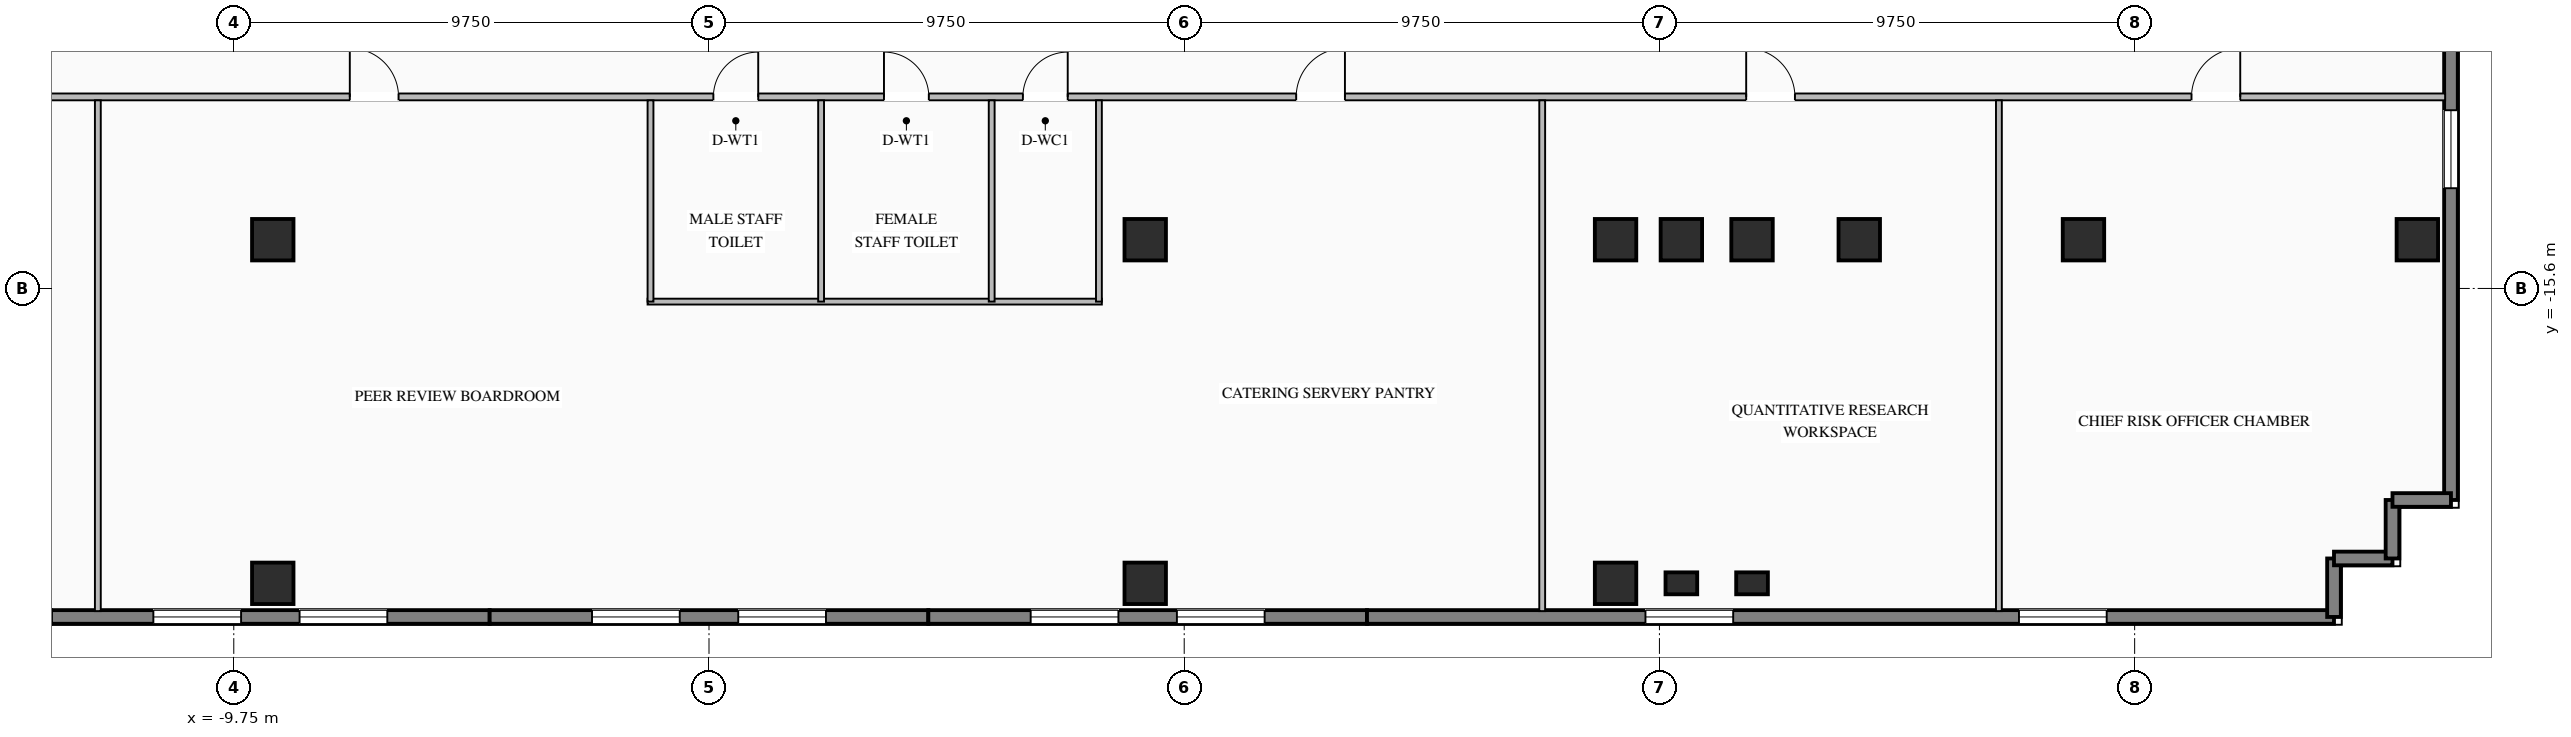
"""IFC4 building model, lengths in metres.
Left out: names, types, materials, properties, quantities, classifications, styles, units other than length and angle.
Written with IfcOpenShell. Run it as: python <this file> out.ifc"""

import sys

from ifc_helpers import new_model, si_unit, direction, frame, frame_2d, origin, origin_2d, place, context, subcontext, project, spatial, rectangle, i_section, extrude, element, fill, save


model = new_model("IFC4")
c1 = context("Model", 3, precision=1e-05, world=origin(), true_north=direction((0.0, 1.0)))
c2 = subcontext(c1, "Body", "Model", "MODEL_VIEW")
j1 = project(units=[si_unit("LENGTHUNIT", "METRE"), si_unit("PLANEANGLEUNIT", "RADIAN")], contexts=[c1])
p1 = place(None, origin())
s1 = spatial("IfcSite", under=j1, at=p1, CompositionType="ELEMENT")
p2 = place(p1, origin())
s2 = spatial("IfcBuilding", under=s1, at=p2, CompositionType="ELEMENT")
p3 = place(p2, frame((0.0, 0.0, 58.8)))
s3 = spatial("IfcBuildingStorey", under=s2, at=p3, CompositionType="ELEMENT", Elevation=58.8)
for number, where, z_axis, x_axis in (
    (1, (-8.95, -14.6, 0.0), (0.0, 0.0, 1.0), (1.0, 0.0, 0.0)),
    (2, (8.95, -14.6, 0.0), (0.0, 0.0, 1.0), (1.0, 0.0, 0.0)),
    (3, (18.6, -14.6, 0.0), (0.0, 0.0, 1.0), (1.0, 0.0, 0.0)),
    (4, (19.95, -14.6, 0.0), (0.0, 0.0, 1.0), (1.0, 0.0, 0.0)),
    (5, (21.4, -14.6, 0.0), (0.0, 0.0, 1.0), (1.0, 0.0, 0.0)),
    (6, (23.6, -14.6, 0.0), (0.0, 0.0, 1.0), (1.0, 0.0, 0.0)),
    (7, (28.2, -14.6, 0.0), (0.0, 0.0, 1.0), (1.0, 0.0, 0.0)),
    (8, (-8.95, -21.65, 0.0), (0.0, 0.0, 1.0), (1.0, 0.0, 0.0)),
    (9, (8.95, -21.65, 0.0), (0.0, 0.0, 1.0), (1.0, 0.0, 0.0)),
    (10, (18.6, -21.65, 0.0), (0.0, 0.0, 1.0), (1.0, 0.0, 0.0)),
    (11, (35.05, -14.6, 0.0), (0.0, 0.0, 1.0), (1.0, 0.0, 0.0)),
):
    element("IfcColumn", number, at=place(p3, frame(where, z_axis=z_axis, x_axis=x_axis)), inside=s3, PredefinedType="COLUMN", context=c2, shape_type="SweptSolid", body=[
        extrude(i_section(OverallWidth=0.85, OverallDepth=0.85, WebThickness=0.032, FlangeThickness=0.048, at=origin_2d()), origin(), (0.0, 0.0, 1.0), 3.45),
    ])
for number, where, z_axis, x_axis in (
    (12, (19.95, -21.65, 0.0), (0.0, 0.0, 1.0), (1.0, 0.0, 0.0)),
    (13, (21.4, -21.65, 0.0), (0.0, 0.0, 1.0), (1.0, 0.0, 0.0)),
):
    element("IfcColumn", number, at=place(p3, frame(where, z_axis=z_axis, x_axis=x_axis)), inside=s3, PredefinedType="PILASTER", context=c2, shape_type="SweptSolid", body=[
        extrude(rectangle(XDim=0.65, YDim=0.45, at=origin_2d()), origin(), (0.0, 0.0, 1.0), 3.45),
    ])
p4 = place(p3, frame((-4.5, -22.34, 0.0), z_axis=(0.0, 0.0, 1.0), x_axis=(-1.0, 0.0, 0.0)))
e14 = element("IfcWall", 14, at=p4, inside=s3, PredefinedType="STANDARD", context=c2, shape_type="SweptSolid", body=[
    extrude(rectangle(XDim=9.0, YDim=0.28, at=frame_2d((4.5, 0.0))), origin(), (0.0, 0.0, 1.0), 3.25),
])
p5 = place(p4, frame((2.1, 0.0, 0.76)))
e15 = element("IfcOpeningElement", 15, at=p5, cuts=e14, PredefinedType="OPENING", context=c2, shape_type="SweptSolid", body=[
    extrude(rectangle(XDim=1.8, YDim=1.95, at=frame_2d((0.9, 0.975))), frame((0.0, 0.15, 0.0), z_axis=(0.0, -1.0, 0.0), x_axis=(1.0, 0.0, 0.0)), (0.0, 0.0, 1.0), 0.3),
])
p6 = place(p4, frame((5.1, 0.0, 0.76)))
e16 = element("IfcOpeningElement", 16, at=p6, cuts=e14, PredefinedType="OPENING", context=c2, shape_type="SweptSolid", body=[
    extrude(rectangle(XDim=1.8, YDim=1.95, at=frame_2d((0.9, 0.975))), frame((0.0, 0.15, 0.0), z_axis=(0.0, -1.0, 0.0), x_axis=(1.0, 0.0, 0.0)), (0.0, 0.0, 1.0), 0.3),
])
p7 = place(p3, frame((4.5, -22.34, 0.0), z_axis=(0.0, 0.0, 1.0), x_axis=(-1.0, 0.0, 0.0)))
e17 = element("IfcWall", 17, at=p7, inside=s3, PredefinedType="STANDARD", context=c2, shape_type="SweptSolid", body=[
    extrude(rectangle(XDim=9.0, YDim=0.28, at=frame_2d((4.5, 0.0))), origin(), (0.0, 0.0, 1.0), 3.25),
])
p8 = place(p7, frame((2.1, 0.0, 0.76)))
e18 = element("IfcOpeningElement", 18, at=p8, cuts=e17, PredefinedType="OPENING", context=c2, shape_type="SweptSolid", body=[
    extrude(rectangle(XDim=1.8, YDim=1.95, at=frame_2d((0.9, 0.975))), frame((0.0, 0.15, 0.0), z_axis=(0.0, -1.0, 0.0), x_axis=(1.0, 0.0, 0.0)), (0.0, 0.0, 1.0), 0.3),
])
p9 = place(p7, frame((5.1, 0.0, 0.76)))
e19 = element("IfcOpeningElement", 19, at=p9, cuts=e17, PredefinedType="OPENING", context=c2, shape_type="SweptSolid", body=[
    extrude(rectangle(XDim=1.8, YDim=1.95, at=frame_2d((0.9, 0.975))), frame((0.0, 0.15, 0.0), z_axis=(0.0, -1.0, 0.0), x_axis=(1.0, 0.0, 0.0)), (0.0, 0.0, 1.0), 0.3),
])
p10 = place(p3, frame((13.5, -22.34, 0.0), z_axis=(0.0, 0.0, 1.0), x_axis=(-1.0, 0.0, 0.0)))
e20 = element("IfcWall", 20, at=p10, inside=s3, PredefinedType="STANDARD", context=c2, shape_type="SweptSolid", body=[
    extrude(rectangle(XDim=9.0, YDim=0.28, at=frame_2d((4.5, 0.0))), origin(), (0.0, 0.0, 1.0), 3.25),
])
p11 = place(p10, frame((2.1, 0.0, 0.76)))
e21 = element("IfcOpeningElement", 21, at=p11, cuts=e20, PredefinedType="OPENING", context=c2, shape_type="SweptSolid", body=[
    extrude(rectangle(XDim=1.8, YDim=1.95, at=frame_2d((0.9, 0.975))), frame((0.0, 0.15, 0.0), z_axis=(0.0, -1.0, 0.0), x_axis=(1.0, 0.0, 0.0)), (0.0, 0.0, 1.0), 0.3),
])
p12 = place(p10, frame((5.1, 0.0, 0.76)))
e22 = element("IfcOpeningElement", 22, at=p12, cuts=e20, PredefinedType="OPENING", context=c2, shape_type="SweptSolid", body=[
    extrude(rectangle(XDim=1.8, YDim=1.95, at=frame_2d((0.9, 0.975))), frame((0.0, 0.15, 0.0), z_axis=(0.0, -1.0, 0.0), x_axis=(1.0, 0.0, 0.0)), (0.0, 0.0, 1.0), 0.3),
])
p13 = place(p3, frame((33.34, -22.34, 0.0), z_axis=(0.0, 0.0, 1.0), x_axis=(-1.0, 0.0, 0.0)))
e23 = element("IfcWall", 23, at=p13, inside=s3, PredefinedType="STANDARD", context=c2, shape_type="SweptSolid", body=[
    extrude(rectangle(XDim=19.84, YDim=0.28, at=frame_2d((9.92, 0.0))), origin(), (0.0, 0.0, 1.0), 3.25),
])
p14 = place(p13, frame((4.663, 0.0, 0.76)))
e24 = element("IfcOpeningElement", 24, at=p14, cuts=e23, PredefinedType="OPENING", context=c2, shape_type="SweptSolid", body=[
    extrude(rectangle(XDim=1.8, YDim=1.95, at=frame_2d((0.9, 0.975))), frame((0.0, 0.15, 0.0), z_axis=(0.0, -1.0, 0.0), x_axis=(1.0, 0.0, 0.0)), (0.0, 0.0, 1.0), 0.3),
])
p15 = place(p13, frame((12.327, 0.0, 0.76)))
e25 = element("IfcOpeningElement", 25, at=p15, cuts=e23, PredefinedType="OPENING", context=c2, shape_type="SweptSolid", body=[
    extrude(rectangle(XDim=1.8, YDim=1.95, at=frame_2d((0.9, 0.975))), frame((0.0, 0.15, 0.0), z_axis=(0.0, -1.0, 0.0), x_axis=(1.0, 0.0, 0.0)), (0.0, 0.0, 1.0), 0.3),
])
p16 = place(p3, frame((35.74, 0.0, 0.0), z_axis=(0.0, 0.0, 1.0), x_axis=(0.0, -1.0, 0.0)))
e26 = element("IfcWall", 26, at=p16, inside=s3, PredefinedType="STANDARD", context=c2, shape_type="SweptSolid", body=[
    extrude(rectangle(XDim=19.94, YDim=0.28, at=frame_2d((9.97, 0.0))), origin(), (0.0, 0.0, 1.0), 3.25),
])
p17 = place(p16, frame((5.847, 0.0, 0.76)))
e27 = element("IfcOpeningElement", 27, at=p17, cuts=e26, PredefinedType="OPENING", context=c2, shape_type="SweptSolid", body=[
    extrude(rectangle(XDim=1.6, YDim=1.95, at=frame_2d((0.8, 0.975))), frame((0.0, 0.15, 0.0), z_axis=(0.0, -1.0, 0.0), x_axis=(1.0, 0.0, 0.0)), (0.0, 0.0, 1.0), 0.3),
])
p18 = place(p16, frame((11.943, 0.0, 0.76)))
e28 = element("IfcOpeningElement", 28, at=p18, cuts=e26, PredefinedType="OPENING", context=c2, shape_type="SweptSolid", body=[
    extrude(rectangle(XDim=1.6, YDim=1.95, at=frame_2d((0.8, 0.975))), frame((0.0, 0.15, 0.0), z_axis=(0.0, -1.0, 0.0), x_axis=(1.0, 0.0, 0.0)), (0.0, 0.0, 1.0), 0.3),
])
p19 = place(p3, frame((33.34, -22.34, 0.0), z_axis=(0.0, 0.0, 1.0), x_axis=(0.0, 1.0, 0.0)))
e29 = element("IfcWall", 29, at=p19, inside=s3, PredefinedType="STANDARD", context=c2, shape_type="SweptSolid", body=[
    extrude(rectangle(XDim=1.2, YDim=0.28, at=frame_2d((0.6, 0.0))), origin(), (0.0, 0.0, 1.0), 3.25),
])
for number, where, z_axis, x_axis in (
    (30, (33.34, -21.14, 0.0), (0.0, 0.0, 1.0), (1.0, 0.0, 0.0)),
    (31, (34.54, -21.14, 0.0), (0.0, 0.0, 1.0), (0.0, 1.0, 0.0)),
    (32, (34.54, -19.94, 0.0), (0.0, 0.0, 1.0), (1.0, 0.0, 0.0)),
):
    element("IfcWall", number, at=place(p3, frame(where, z_axis=z_axis, x_axis=x_axis)), inside=s3, PredefinedType="STANDARD", context=c2, shape_type="SweptSolid", body=[
        extrude(rectangle(XDim=1.2, YDim=0.28, at=frame_2d((0.6, 0.0))), origin(), (0.0, 0.0, 1.0), 3.25),
    ])
p20 = place(p3, frame((-35.62, -11.67, 0.0), z_axis=(0.0, 0.0, 1.0), x_axis=(1.0, 0.0, 0.0)))
e33 = element("IfcWall", 33, at=p20, inside=s3, PredefinedType="STANDARD", context=c2, shape_type="SweptSolid", body=[
    extrude(rectangle(XDim=71.24, YDim=0.14, at=frame_2d((35.62, 0.0))), origin(), (0.0, 0.0, 1.0), 3.25),
])
p21 = place(p20, frame((35.71, 0.0, 0.0)))
e34 = element("IfcOpeningElement", 34, at=p21, cuts=e33, PredefinedType="OPENING", context=c2, shape_type="SweptSolid", body=[
    extrude(rectangle(XDim=0.92, YDim=2.08, at=frame_2d((0.46, 1.04))), frame((0.0, 0.08, 0.0), z_axis=(0.0, -1.0, 0.0), x_axis=(1.0, 0.0, 0.0)), (0.0, 0.0, 1.0), 0.16),
])
p22 = place(p20, frame((39.21, 0.0, 0.0)))
e35 = element("IfcOpeningElement", 35, at=p22, cuts=e33, PredefinedType="OPENING", context=c2, shape_type="SweptSolid", body=[
    extrude(rectangle(XDim=0.92, YDim=2.08, at=frame_2d((0.46, 1.04))), frame((0.0, 0.08, 0.0), z_axis=(0.0, -1.0, 0.0), x_axis=(1.0, 0.0, 0.0)), (0.0, 0.0, 1.0), 0.16),
])
p23 = place(p20, frame((42.06, 0.0, 0.0)))
e36 = element("IfcOpeningElement", 36, at=p23, cuts=e33, PredefinedType="OPENING", context=c2, shape_type="SweptSolid", body=[
    extrude(rectangle(XDim=0.92, YDim=2.08, at=frame_2d((0.46, 1.04))), frame((0.0, 0.08, 0.0), z_axis=(0.0, -1.0, 0.0), x_axis=(1.0, 0.0, 0.0)), (0.0, 0.0, 1.0), 0.16),
])
p24 = place(p20, frame((5.325, 0.0, 0.0)))
e37 = element("IfcOpeningElement", 37, at=p24, cuts=e33, PredefinedType="OPENING", context=c2, shape_type="SweptSolid", body=[
    extrude(rectangle(XDim=1.0, YDim=2.08, at=frame_2d((0.5, 1.04))), frame((0.0, 0.08, 0.0), z_axis=(0.0, -1.0, 0.0), x_axis=(1.0, 0.0, 0.0)), (0.0, 0.0, 1.0), 0.16),
])
p25 = place(p20, frame((16.74, 0.0, 0.0)))
e38 = element("IfcOpeningElement", 38, at=p25, cuts=e33, PredefinedType="OPENING", context=c2, shape_type="SweptSolid", body=[
    extrude(rectangle(XDim=1.0, YDim=2.08, at=frame_2d((0.5, 1.04))), frame((0.0, 0.08, 0.0), z_axis=(0.0, -1.0, 0.0), x_axis=(1.0, 0.0, 0.0)), (0.0, 0.0, 1.0), 0.16),
])
p26 = place(p20, frame((28.25, 0.0, 0.0)))
e39 = element("IfcOpeningElement", 39, at=p26, cuts=e33, PredefinedType="OPENING", context=c2, shape_type="SweptSolid", body=[
    extrude(rectangle(XDim=1.0, YDim=2.08, at=frame_2d((0.5, 1.04))), frame((0.0, 0.08, 0.0), z_axis=(0.0, -1.0, 0.0), x_axis=(1.0, 0.0, 0.0)), (0.0, 0.0, 1.0), 0.16),
])
p27 = place(p20, frame((47.667, 0.0, 0.0)))
e40 = element("IfcOpeningElement", 40, at=p27, cuts=e33, PredefinedType="OPENING", context=c2, shape_type="SweptSolid", body=[
    extrude(rectangle(XDim=1.0, YDim=2.08, at=frame_2d((0.5, 1.04))), frame((0.0, 0.08, 0.0), z_axis=(0.0, -1.0, 0.0), x_axis=(1.0, 0.0, 0.0)), (0.0, 0.0, 1.0), 0.16),
])
p28 = place(p20, frame((56.9, 0.0, 0.0)))
e41 = element("IfcOpeningElement", 41, at=p28, cuts=e33, PredefinedType="OPENING", context=c2, shape_type="SweptSolid", body=[
    extrude(rectangle(XDim=1.0, YDim=2.08, at=frame_2d((0.5, 1.04))), frame((0.0, 0.08, 0.0), z_axis=(0.0, -1.0, 0.0), x_axis=(1.0, 0.0, 0.0)), (0.0, 0.0, 1.0), 0.16),
])
p29 = place(p20, frame((66.037, 0.0, 0.0)))
e42 = element("IfcOpeningElement", 42, at=p29, cuts=e33, PredefinedType="OPENING", context=c2, shape_type="SweptSolid", body=[
    extrude(rectangle(XDim=1.0, YDim=2.08, at=frame_2d((0.5, 1.04))), frame((0.0, 0.08, 0.0), z_axis=(0.0, -1.0, 0.0), x_axis=(1.0, 0.0, 0.0)), (0.0, 0.0, 1.0), 0.16),
])
p30 = place(p3, frame((-1.26, -15.87, 0.0), z_axis=(0.0, 0.0, 1.0), x_axis=(1.0, 0.0, 0.0)))
e43 = element("IfcWall", 43, at=p30, inside=s3, PredefinedType="STANDARD", context=c2, shape_type="SweptSolid", body=[
    extrude(rectangle(XDim=9.32, YDim=0.12, at=frame_2d((4.66, 0.0))), origin(), (0.0, 0.0, 1.0), 3.25),
])
for number, where, z_axis, x_axis in (
    (44, (-1.2, -15.87, 0.0), (0.0, 0.0, 1.0), (0.0, 1.0, 0.0)),
    (45, (2.3, -15.87, 0.0), (0.0, 0.0, 1.0), (0.0, 1.0, 0.0)),
    (46, (5.8, -15.87, 0.0), (0.0, 0.0, 1.0), (0.0, 1.0, 0.0)),
    (47, (8.0, -15.87, 0.0), (0.0, 0.0, 1.0), (0.0, 1.0, 0.0)),
):
    element("IfcWall", number, at=place(p3, frame(where, z_axis=z_axis, x_axis=x_axis)), inside=s3, PredefinedType="STANDARD", context=c2, shape_type="SweptSolid", body=[
        extrude(rectangle(XDim=4.13, YDim=0.12, at=frame_2d((2.065, 0.0))), origin(), (0.0, 0.0, 1.0), 3.25),
    ])
for number, where, z_axis, x_axis in (
    (48, (-12.539, -22.22, 0.0), (0.0, 0.0, 1.0), (0.0, 1.0, 0.0)),
    (49, (17.095, -22.22, 0.0), (0.0, 0.0, 1.0), (0.0, 1.0, 0.0)),
    (50, (26.465, -22.22, 0.0), (0.0, 0.0, 1.0), (0.0, 1.0, 0.0)),
):
    element("IfcWall", number, at=place(p3, frame(where, z_axis=z_axis, x_axis=x_axis)), inside=s3, PredefinedType="STANDARD", context=c2, shape_type="SweptSolid", body=[
        extrude(rectangle(XDim=10.48, YDim=0.12, at=frame_2d((5.24, 0.0))), origin(), (0.0, 0.0, 1.0), 3.25),
    ])
p31 = place(p5, origin())
e51 = element("IfcWindow", 51, at=p31, inside=s3, PartitioningType="SINGLE_PANEL", PredefinedType="WINDOW", context=c2, shape_type="SweptSolid", body=[
    extrude(rectangle(XDim=1.8, YDim=1.95, at=frame_2d((0.9, 0.975))), frame((0.0, 0.03, 0.0), z_axis=(0.0, -1.0, 0.0), x_axis=(1.0, 0.0, 0.0)), (0.0, 0.0, 1.0), 0.06),
])
fill(e15, e51)
p32 = place(p6, origin())
e52 = element("IfcWindow", 52, at=p32, inside=s3, PartitioningType="SINGLE_PANEL", PredefinedType="WINDOW", context=c2, shape_type="SweptSolid", body=[
    extrude(rectangle(XDim=1.8, YDim=1.95, at=frame_2d((0.9, 0.975))), frame((0.0, 0.03, 0.0), z_axis=(0.0, -1.0, 0.0), x_axis=(1.0, 0.0, 0.0)), (0.0, 0.0, 1.0), 0.06),
])
fill(e16, e52)
p33 = place(p8, origin())
e53 = element("IfcWindow", 53, at=p33, inside=s3, PartitioningType="SINGLE_PANEL", PredefinedType="WINDOW", context=c2, shape_type="SweptSolid", body=[
    extrude(rectangle(XDim=1.8, YDim=1.95, at=frame_2d((0.9, 0.975))), frame((0.0, 0.03, 0.0), z_axis=(0.0, -1.0, 0.0), x_axis=(1.0, 0.0, 0.0)), (0.0, 0.0, 1.0), 0.06),
])
fill(e18, e53)
p34 = place(p9, origin())
e54 = element("IfcWindow", 54, at=p34, inside=s3, PartitioningType="SINGLE_PANEL", PredefinedType="WINDOW", context=c2, shape_type="SweptSolid", body=[
    extrude(rectangle(XDim=1.8, YDim=1.95, at=frame_2d((0.9, 0.975))), frame((0.0, 0.03, 0.0), z_axis=(0.0, -1.0, 0.0), x_axis=(1.0, 0.0, 0.0)), (0.0, 0.0, 1.0), 0.06),
])
fill(e19, e54)
p35 = place(p11, origin())
e55 = element("IfcWindow", 55, at=p35, inside=s3, PartitioningType="SINGLE_PANEL", PredefinedType="WINDOW", context=c2, shape_type="SweptSolid", body=[
    extrude(rectangle(XDim=1.8, YDim=1.95, at=frame_2d((0.9, 0.975))), frame((0.0, 0.03, 0.0), z_axis=(0.0, -1.0, 0.0), x_axis=(1.0, 0.0, 0.0)), (0.0, 0.0, 1.0), 0.06),
])
fill(e21, e55)
p36 = place(p12, origin())
e56 = element("IfcWindow", 56, at=p36, inside=s3, PartitioningType="SINGLE_PANEL", PredefinedType="WINDOW", context=c2, shape_type="SweptSolid", body=[
    extrude(rectangle(XDim=1.8, YDim=1.95, at=frame_2d((0.9, 0.975))), frame((0.0, 0.03, 0.0), z_axis=(0.0, -1.0, 0.0), x_axis=(1.0, 0.0, 0.0)), (0.0, 0.0, 1.0), 0.06),
])
fill(e22, e56)
p37 = place(p14, origin())
e57 = element("IfcWindow", 57, at=p37, inside=s3, PartitioningType="SINGLE_PANEL", PredefinedType="WINDOW", context=c2, shape_type="SweptSolid", body=[
    extrude(rectangle(XDim=1.8, YDim=1.95, at=frame_2d((0.9, 0.975))), frame((0.0, 0.03, 0.0), z_axis=(0.0, -1.0, 0.0), x_axis=(1.0, 0.0, 0.0)), (0.0, 0.0, 1.0), 0.06),
])
fill(e24, e57)
p38 = place(p15, origin())
e58 = element("IfcWindow", 58, at=p38, inside=s3, PartitioningType="SINGLE_PANEL", PredefinedType="WINDOW", context=c2, shape_type="SweptSolid", body=[
    extrude(rectangle(XDim=1.8, YDim=1.95, at=frame_2d((0.9, 0.975))), frame((0.0, 0.03, 0.0), z_axis=(0.0, -1.0, 0.0), x_axis=(1.0, 0.0, 0.0)), (0.0, 0.0, 1.0), 0.06),
])
fill(e25, e58)
p39 = place(p18, origin())
e59 = element("IfcWindow", 59, at=p39, inside=s3, PartitioningType="SINGLE_PANEL", PredefinedType="WINDOW", context=c2, shape_type="SweptSolid", body=[
    extrude(rectangle(XDim=1.6, YDim=1.95, at=frame_2d((0.8, 0.975))), frame((0.0, 0.03, 0.0), z_axis=(0.0, -1.0, 0.0), x_axis=(1.0, 0.0, 0.0)), (0.0, 0.0, 1.0), 0.06),
])
fill(e28, e59)
p40 = place(p21, origin())
e60 = element("IfcDoor", 60, at=p40, inside=s3, OperationType="SINGLE_SWING_RIGHT", PredefinedType="DOOR", context=c2, shape_type="SweptSolid", body=[
    extrude(rectangle(XDim=0.92, YDim=2.08, at=frame_2d((0.46, 1.04))), frame((0.0, 0.025, 0.0), z_axis=(0.0, -1.0, 0.0), x_axis=(1.0, 0.0, 0.0)), (0.0, 0.0, 1.0), 0.05),
])
fill(e34, e60)
p41 = place(p22, origin())
e61 = element("IfcDoor", 61, at=p41, inside=s3, OperationType="SINGLE_SWING_LEFT", PredefinedType="DOOR", context=c2, shape_type="SweptSolid", body=[
    extrude(rectangle(XDim=0.92, YDim=2.08, at=frame_2d((0.46, 1.04))), frame((0.0, 0.025, 0.0), z_axis=(0.0, -1.0, 0.0), x_axis=(1.0, 0.0, 0.0)), (0.0, 0.0, 1.0), 0.05),
])
fill(e35, e61)
p42 = place(p23, origin())
e62 = element("IfcDoor", 62, at=p42, inside=s3, OperationType="SINGLE_SWING_RIGHT", PredefinedType="DOOR", context=c2, shape_type="SweptSolid", body=[
    extrude(rectangle(XDim=0.92, YDim=2.08, at=frame_2d((0.46, 1.04))), frame((0.0, 0.025, 0.0), z_axis=(0.0, -1.0, 0.0), x_axis=(1.0, 0.0, 0.0)), (0.0, 0.0, 1.0), 0.05),
])
fill(e36, e62)
p43 = place(p26, origin())
e63 = element("IfcDoor", 63, at=p43, inside=s3, OperationType="SINGLE_SWING_LEFT", PredefinedType="DOOR", context=c2, shape_type="SweptSolid", body=[
    extrude(rectangle(XDim=1.0, YDim=2.08, at=frame_2d((0.5, 1.04))), frame((0.0, 0.025, 0.0), z_axis=(0.0, -1.0, 0.0), x_axis=(1.0, 0.0, 0.0)), (0.0, 0.0, 1.0), 0.05),
])
fill(e39, e63)
p44 = place(p27, origin())
e64 = element("IfcDoor", 64, at=p44, inside=s3, OperationType="SINGLE_SWING_RIGHT", PredefinedType="DOOR", context=c2, shape_type="SweptSolid", body=[
    extrude(rectangle(XDim=1.0, YDim=2.08, at=frame_2d((0.5, 1.04))), frame((0.0, 0.025, 0.0), z_axis=(0.0, -1.0, 0.0), x_axis=(1.0, 0.0, 0.0)), (0.0, 0.0, 1.0), 0.05),
])
fill(e40, e64)
p45 = place(p28, origin())
e65 = element("IfcDoor", 65, at=p45, inside=s3, OperationType="SINGLE_SWING_LEFT", PredefinedType="DOOR", context=c2, shape_type="SweptSolid", body=[
    extrude(rectangle(XDim=1.0, YDim=2.08, at=frame_2d((0.5, 1.04))), frame((0.0, 0.025, 0.0), z_axis=(0.0, -1.0, 0.0), x_axis=(1.0, 0.0, 0.0)), (0.0, 0.0, 1.0), 0.05),
])
fill(e41, e65)
p46 = place(p29, origin())
e66 = element("IfcDoor", 66, at=p46, inside=s3, OperationType="SINGLE_SWING_RIGHT", PredefinedType="DOOR", context=c2, shape_type="SweptSolid", body=[
    extrude(rectangle(XDim=1.0, YDim=2.08, at=frame_2d((0.5, 1.04))), frame((0.0, 0.025, 0.0), z_axis=(0.0, -1.0, 0.0), x_axis=(1.0, 0.0, 0.0)), (0.0, 0.0, 1.0), 0.05),
])
fill(e42, e66)
save(model, sys.argv[1])
